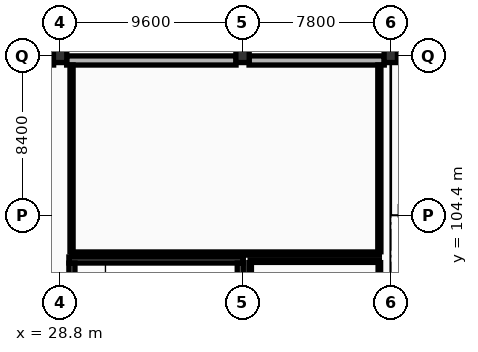
"""IFC4 building model, lengths in metres.
Left out: names, types, materials, properties, quantities, classifications, styles, units other than length and angle.
Written with IfcOpenShell. Run it as: python <this file> out.ifc"""

import sys

from ifc_helpers import new_model, si_unit, direction, frame, frame_2d, origin, origin_2d, place, context, subcontext, project, spatial, rectangle, extrude, element, fill, save


model = new_model("IFC4")
c1 = context("Model", 3, precision=1e-05, world=origin(), true_north=direction((0.0, 1.0)))
c2 = subcontext(c1, "Body", "Model", "MODEL_VIEW")
j1 = project(units=[si_unit("LENGTHUNIT", "METRE"), si_unit("PLANEANGLEUNIT", "RADIAN")], contexts=[c1])
p1 = place(None, origin())
s1 = spatial("IfcSite", under=j1, at=p1, CompositionType="ELEMENT")
p2 = place(p1, origin())
s2 = spatial("IfcBuilding", under=s1, at=p2, CompositionType="ELEMENT")
p3 = place(p2, frame((0.0, 0.0, 5.4)))
s3 = spatial("IfcBuildingStorey", under=s2, at=p3, CompositionType="ELEMENT", Elevation=5.4)
for number, where, z_axis, x_axis in (
    (1, (28.8, 112.8, 0.0), (0.0, 0.0, 1.0), (1.0, 0.0, 0.0)),
    (2, (38.4, 112.8, 0.0), (0.0, 0.0, 1.0), (1.0, 0.0, 0.0)),
    (3, (46.2, 112.8, 0.0), (0.0, 0.0, 1.0), (1.0, 0.0, 0.0)),
):
    element("IfcColumn", number, at=place(p3, frame(where, z_axis=z_axis, x_axis=x_axis)), inside=s3, PredefinedType="COLUMN", context=c2, shape_type="SweptSolid", body=[
        extrude(rectangle(XDim=0.7, YDim=0.7, at=origin_2d()), origin(), (0.0, 0.0, 1.0), 4.5),
    ])
p4 = place(p3, frame((19.542, 112.56, 0.0), z_axis=(0.0, 0.0, 1.0), x_axis=(1.0, 0.0, 0.0)))
e4 = element("IfcWall", 4, at=p4, inside=s3, PredefinedType="STANDARD", context=c2, shape_type="SweptSolid", body=[
    extrude(rectangle(XDim=8.916, YDim=0.48, at=frame_2d((4.458, 0.0))), origin(), (0.0, 0.0, 1.0), 3.28),
])
p5 = place(p4, frame((1.095, 0.0, 0.76)))
e5 = element("IfcOpeningElement", 5, at=p5, cuts=e4, PredefinedType="OPENING", context=c2, shape_type="SweptSolid", body=[
    extrude(rectangle(XDim=1.7, YDim=2.3, at=frame_2d((0.85, 1.15))), frame((0.0, 0.25, 0.0), z_axis=(0.0, -1.0, 0.0), x_axis=(1.0, 0.0, 0.0)), (0.0, 0.0, 1.0), 0.5),
])
p6 = place(p4, frame((3.608, 0.0, 0.76)))
e6 = element("IfcOpeningElement", 6, at=p6, cuts=e4, PredefinedType="OPENING", context=c2, shape_type="SweptSolid", body=[
    extrude(rectangle(XDim=1.7, YDim=2.3, at=frame_2d((0.85, 1.15))), frame((0.0, 0.25, 0.0), z_axis=(0.0, -1.0, 0.0), x_axis=(1.0, 0.0, 0.0)), (0.0, 0.0, 1.0), 0.5),
])
p7 = place(p4, frame((6.121, 0.0, 0.76)))
e7 = element("IfcOpeningElement", 7, at=p7, cuts=e4, PredefinedType="OPENING", context=c2, shape_type="SweptSolid", body=[
    extrude(rectangle(XDim=1.7, YDim=2.3, at=frame_2d((0.85, 1.15))), frame((0.0, 0.25, 0.0), z_axis=(0.0, -1.0, 0.0), x_axis=(1.0, 0.0, 0.0)), (0.0, 0.0, 1.0), 0.5),
])
p8 = place(p3, frame((29.142, 112.56, 0.0), z_axis=(0.0, 0.0, 1.0), x_axis=(1.0, 0.0, 0.0)))
e8 = element("IfcWall", 8, at=p8, inside=s3, PredefinedType="STANDARD", context=c2, shape_type="SweptSolid", body=[
    extrude(rectangle(XDim=8.916, YDim=0.48, at=frame_2d((4.458, 0.0))), origin(), (0.0, 0.0, 1.0), 3.28),
])
p9 = place(p8, frame((1.095, 0.0, 0.76)))
e9 = element("IfcOpeningElement", 9, at=p9, cuts=e8, PredefinedType="OPENING", context=c2, shape_type="SweptSolid", body=[
    extrude(rectangle(XDim=1.7, YDim=2.3, at=frame_2d((0.85, 1.15))), frame((0.0, 0.25, 0.0), z_axis=(0.0, -1.0, 0.0), x_axis=(1.0, 0.0, 0.0)), (0.0, 0.0, 1.0), 0.5),
])
p10 = place(p8, frame((3.608, 0.0, 0.76)))
e10 = element("IfcOpeningElement", 10, at=p10, cuts=e8, PredefinedType="OPENING", context=c2, shape_type="SweptSolid", body=[
    extrude(rectangle(XDim=1.7, YDim=2.3, at=frame_2d((0.85, 1.15))), frame((0.0, 0.25, 0.0), z_axis=(0.0, -1.0, 0.0), x_axis=(1.0, 0.0, 0.0)), (0.0, 0.0, 1.0), 0.5),
])
p11 = place(p8, frame((6.121, 0.0, 0.76)))
e11 = element("IfcOpeningElement", 11, at=p11, cuts=e8, PredefinedType="OPENING", context=c2, shape_type="SweptSolid", body=[
    extrude(rectangle(XDim=1.7, YDim=2.3, at=frame_2d((0.85, 1.15))), frame((0.0, 0.25, 0.0), z_axis=(0.0, -1.0, 0.0), x_axis=(1.0, 0.0, 0.0)), (0.0, 0.0, 1.0), 0.5),
])
p12 = place(p3, frame((38.742, 112.56, 0.0), z_axis=(0.0, 0.0, 1.0), x_axis=(1.0, 0.0, 0.0)))
e12 = element("IfcWall", 12, at=p12, inside=s3, PredefinedType="STANDARD", context=c2, shape_type="SweptSolid", body=[
    extrude(rectangle(XDim=7.116, YDim=0.48, at=frame_2d((3.558, 0.0))), origin(), (0.0, 0.0, 1.0), 3.28),
])
p13 = place(p12, frame((1.273, 0.0, 0.76)))
e13 = element("IfcOpeningElement", 13, at=p13, cuts=e12, PredefinedType="OPENING", context=c2, shape_type="SweptSolid", body=[
    extrude(rectangle(XDim=1.7, YDim=2.3, at=frame_2d((0.85, 1.15))), frame((0.0, 0.25, 0.0), z_axis=(0.0, -1.0, 0.0), x_axis=(1.0, 0.0, 0.0)), (0.0, 0.0, 1.0), 0.5),
])
p14 = place(p12, frame((4.143, 0.0, 0.76)))
e14 = element("IfcOpeningElement", 14, at=p14, cuts=e12, PredefinedType="OPENING", context=c2, shape_type="SweptSolid", body=[
    extrude(rectangle(XDim=1.7, YDim=2.3, at=frame_2d((0.85, 1.15))), frame((0.0, 0.25, 0.0), z_axis=(0.0, -1.0, 0.0), x_axis=(1.0, 0.0, 0.0)), (0.0, 0.0, 1.0), 0.5),
])
p15 = place(p3, frame((29.26, 102.06, 0.0), z_axis=(0.0, 0.0, 1.0), x_axis=(1.0, 0.0, 0.0)))
e15 = element("IfcWall", 15, at=p15, inside=s3, PredefinedType="SHEAR", context=c2, shape_type="SweptSolid", body=[
    extrude(rectangle(XDim=9.18, YDim=0.32, at=frame_2d((4.59, 0.0))), origin(), (0.0, 0.0, 1.0), 4.24),
])
p16 = place(p3, frame((29.42, 98.58, 0.0), z_axis=(0.0, 0.0, 1.0), x_axis=(0.0, 1.0, 0.0)))
e16 = element("IfcWall", 16, at=p16, inside=s3, PredefinedType="SHEAR", context=c2, shape_type="SweptSolid", body=[
    extrude(rectangle(XDim=3.32, YDim=0.32, at=frame_2d((1.66, 0.0))), origin(), (0.0, 0.0, 1.0), 4.24),
])
p17 = place(p16, frame((1.085, 0.0, 0.0)))
e17 = element("IfcOpeningElement", 17, at=p17, cuts=e16, PredefinedType="OPENING", context=c2, shape_type="SweptSolid", body=[
    extrude(rectangle(XDim=1.15, YDim=2.2, at=frame_2d((0.575, 1.1))), frame((0.0, 0.17, 0.0), z_axis=(0.0, -1.0, 0.0), x_axis=(1.0, 0.0, 0.0)), (0.0, 0.0, 1.0), 0.34),
])
p18 = place(p3, frame((38.28, 101.9, 0.0), z_axis=(0.0, 0.0, 1.0), x_axis=(0.0, -1.0, 0.0)))
e18 = element("IfcWall", 18, at=p18, inside=s3, PredefinedType="SHEAR", context=c2, shape_type="SweptSolid", body=[
    extrude(rectangle(XDim=3.32, YDim=0.32, at=frame_2d((1.66, 0.0))), origin(), (0.0, 0.0, 1.0), 4.24),
])
p19 = place(p3, frame((45.6, 102.4, 0.0), z_axis=(0.0, 0.0, 1.0), x_axis=(-1.0, 0.0, 0.0)))
e19 = element("IfcWall", 19, at=p19, inside=s3, PredefinedType="PARTITIONING", context=c2, shape_type="SweptSolid", body=[
    extrude(rectangle(XDim=16.2, YDim=0.165, at=frame_2d((8.1, 0.0))), origin(), (0.0, 0.0, 1.0), 3.28),
])
p20 = place(p3, frame((29.4, 102.492, 0.0), z_axis=(0.0, 0.0, 1.0), x_axis=(0.0, 1.0, 0.0)))
e20 = element("IfcWall", 20, at=p20, inside=s3, PredefinedType="PARTITIONING", context=c2, shape_type="SweptSolid", body=[
    extrude(rectangle(XDim=9.833, YDim=0.165, at=frame_2d((4.917, 0.0))), origin(), (0.0, 0.0, 1.0), 3.58),
])
p21 = place(p20, frame((1.977, 0.0, 0.0)))
e21 = element("IfcOpeningElement", 21, at=p21, cuts=e20, PredefinedType="OPENING", context=c2, shape_type="SweptSolid", body=[
    extrude(rectangle(XDim=1.0, YDim=2.15, at=frame_2d((0.5, 1.075))), frame((0.0, 0.093, 0.0), z_axis=(0.0, -1.0, 0.0), x_axis=(1.0, 0.0, 0.0)), (0.0, 0.0, 1.0), 0.185),
])
p22 = place(p3, frame((45.6, 112.326, 0.0), z_axis=(0.0, 0.0, 1.0), x_axis=(0.0, -1.0, 0.0)))
e22 = element("IfcWall", 22, at=p22, inside=s3, PredefinedType="PARTITIONING", context=c2, shape_type="SweptSolid", body=[
    extrude(rectangle(XDim=9.833, YDim=0.165, at=frame_2d((4.917, 0.0))), origin(), (0.0, 0.0, 1.0), 3.62),
])
p23 = place(p3, frame((38.8, 102.0, 0.0), z_axis=(0.0, 0.0, 1.0), x_axis=(1.0, 0.0, 0.0)))
e23 = element("IfcWall", 23, at=p23, inside=s3, PredefinedType="PARTITIONING", context=c2, shape_type="SweptSolid", body=[
    extrude(rectangle(XDim=6.8, YDim=0.135, at=frame_2d((3.4, 0.0))), origin(), (0.0, 0.0, 1.0), 3.28),
])
p24 = place(p3, frame((38.8, 89.278, 0.0), z_axis=(0.0, 0.0, 1.0), x_axis=(0.0, 1.0, 0.0)))
e24 = element("IfcWall", 24, at=p24, inside=s3, PredefinedType="PARTITIONING", context=c2, shape_type="SweptSolid", body=[
    extrude(rectangle(XDim=12.645, YDim=0.135, at=frame_2d((6.323, 0.0))), origin(), (0.0, 0.0, 1.0), 3.28),
])
p25 = place(p3, frame((45.6, 101.923, 0.0), z_axis=(0.0, 0.0, 1.0), x_axis=(0.0, -1.0, 0.0)))
e25 = element("IfcWall", 25, at=p25, inside=s3, PredefinedType="PARTITIONING", context=c2, shape_type="SweptSolid", body=[
    extrude(rectangle(XDim=12.645, YDim=0.135, at=frame_2d((6.323, 0.0))), origin(), (0.0, 0.0, 1.0), 3.57),
])
p26 = place(p9, origin())
e26 = element("IfcWindow", 26, at=p26, inside=s3, PartitioningType="SINGLE_PANEL", PredefinedType="WINDOW", context=c2, shape_type="SweptSolid", body=[
    extrude(rectangle(XDim=1.7, YDim=2.3, at=frame_2d((0.85, 1.15))), frame((0.0, 0.03, 0.0), z_axis=(0.0, -1.0, 0.0), x_axis=(1.0, 0.0, 0.0)), (0.0, 0.0, 1.0), 0.06),
])
fill(e9, e26)
p27 = place(p10, origin())
e27 = element("IfcWindow", 27, at=p27, inside=s3, PartitioningType="SINGLE_PANEL", PredefinedType="WINDOW", context=c2, shape_type="SweptSolid", body=[
    extrude(rectangle(XDim=1.7, YDim=2.3, at=frame_2d((0.85, 1.15))), frame((0.0, 0.03, 0.0), z_axis=(0.0, -1.0, 0.0), x_axis=(1.0, 0.0, 0.0)), (0.0, 0.0, 1.0), 0.06),
])
fill(e10, e27)
p28 = place(p11, origin())
e28 = element("IfcWindow", 28, at=p28, inside=s3, PartitioningType="SINGLE_PANEL", PredefinedType="WINDOW", context=c2, shape_type="SweptSolid", body=[
    extrude(rectangle(XDim=1.7, YDim=2.3, at=frame_2d((0.85, 1.15))), frame((0.0, 0.03, 0.0), z_axis=(0.0, -1.0, 0.0), x_axis=(1.0, 0.0, 0.0)), (0.0, 0.0, 1.0), 0.06),
])
fill(e11, e28)
p29 = place(p13, origin())
e29 = element("IfcWindow", 29, at=p29, inside=s3, PartitioningType="SINGLE_PANEL", PredefinedType="WINDOW", context=c2, shape_type="SweptSolid", body=[
    extrude(rectangle(XDim=1.7, YDim=2.3, at=frame_2d((0.85, 1.15))), frame((0.0, 0.03, 0.0), z_axis=(0.0, -1.0, 0.0), x_axis=(1.0, 0.0, 0.0)), (0.0, 0.0, 1.0), 0.06),
])
fill(e13, e29)
p30 = place(p14, origin())
e30 = element("IfcWindow", 30, at=p30, inside=s3, PartitioningType="SINGLE_PANEL", PredefinedType="WINDOW", context=c2, shape_type="SweptSolid", body=[
    extrude(rectangle(XDim=1.7, YDim=2.3, at=frame_2d((0.85, 1.15))), frame((0.0, 0.03, 0.0), z_axis=(0.0, -1.0, 0.0), x_axis=(1.0, 0.0, 0.0)), (0.0, 0.0, 1.0), 0.06),
])
fill(e14, e30)
p31 = place(p21, origin())
e31 = element("IfcDoor", 31, at=p31, inside=s3, OperationType="SINGLE_SWING_LEFT", PredefinedType="DOOR", context=c2, shape_type="SweptSolid", body=[
    extrude(rectangle(XDim=1.0, YDim=2.15, at=frame_2d((0.5, 1.075))), frame((0.0, 0.025, 0.0), z_axis=(0.0, -1.0, 0.0), x_axis=(1.0, 0.0, 0.0)), (0.0, 0.0, 1.0), 0.05),
])
fill(e21, e31)
save(model, sys.argv[1])
